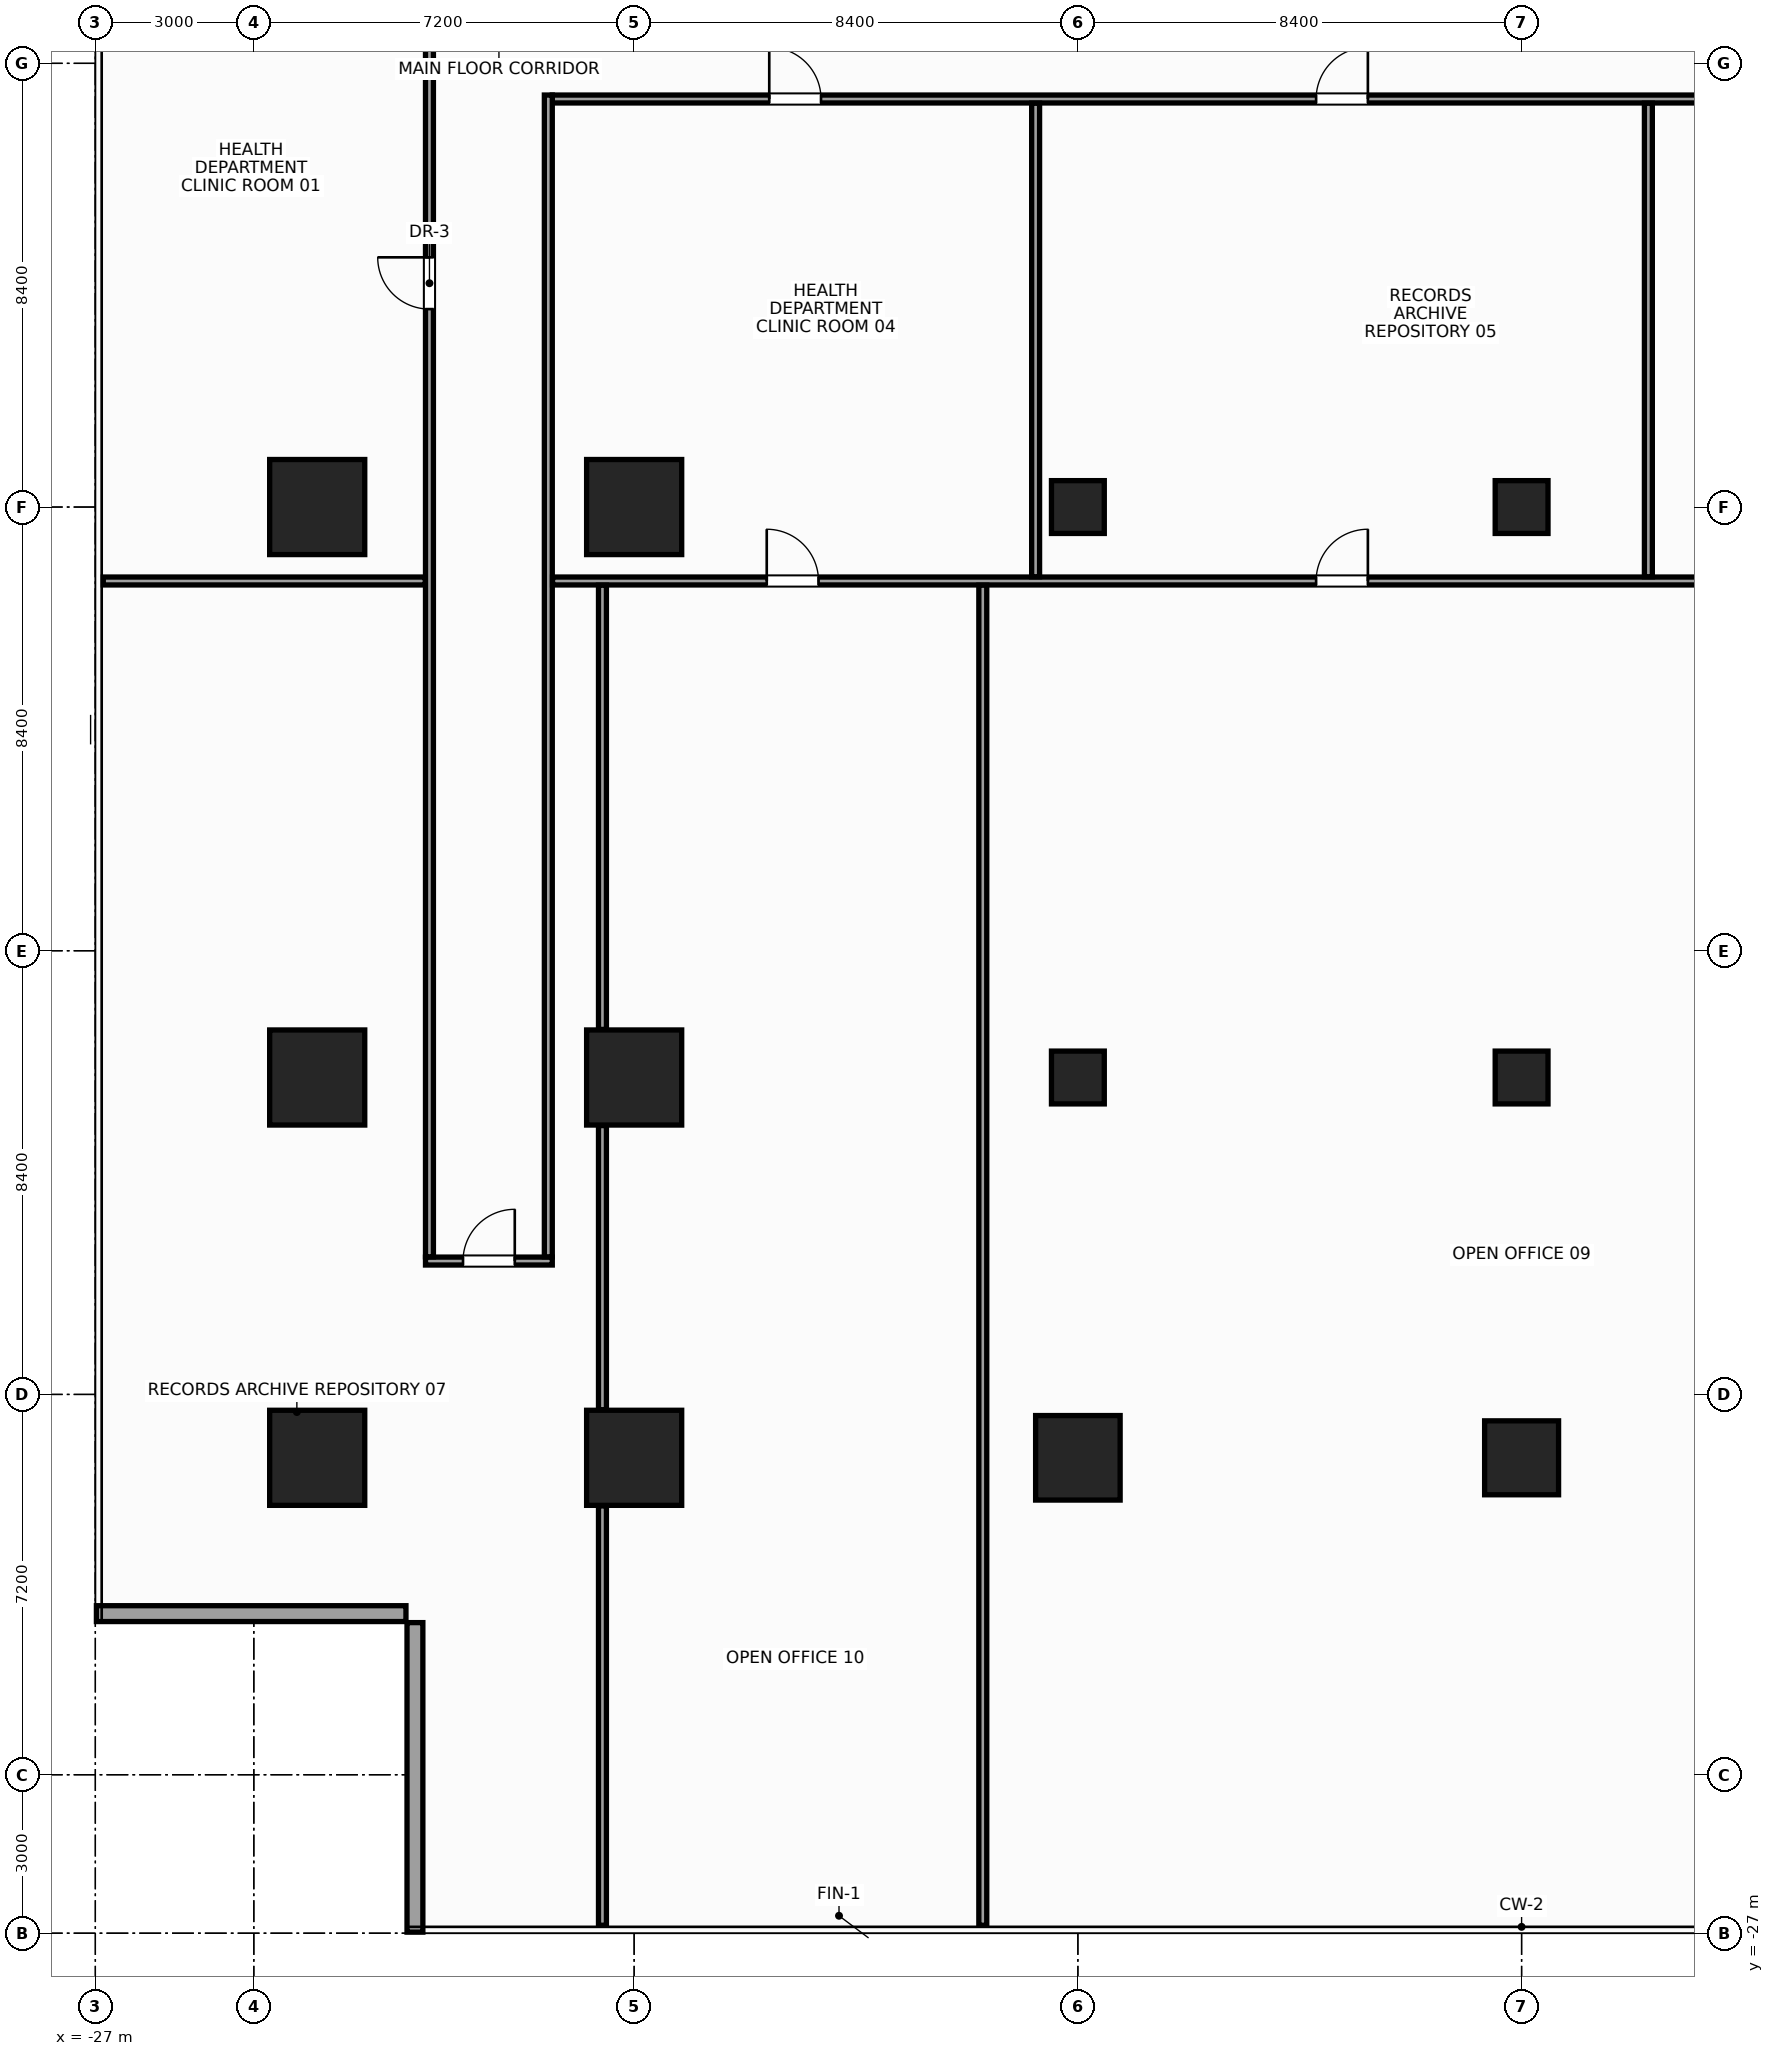
"""IFC4 building model, lengths in metres.
Left out: names, types, materials, properties, quantities, classifications, styles, units other than length and angle.
Written with IfcOpenShell. Run it as: python <this file> out.ifc"""

import sys

from ifc_helpers import new_model, si_unit, direction, frame, frame_2d, origin, origin_2d, place, context, subcontext, project, spatial, rectangle, hollow_rectangle, extrude, source, transform, mapped, element, fill, save


model = new_model("IFC4")
c1 = context("Model", 3, precision=1e-05, world=origin(), true_north=direction((0.0, 1.0)))
c2 = subcontext(c1, "Body", "Model", "MODEL_VIEW")
j1 = project(units=[si_unit("LENGTHUNIT", "METRE"), si_unit("PLANEANGLEUNIT", "RADIAN")], contexts=[c1])
p1 = place(None, origin())
s1 = spatial("IfcSite", under=j1, at=p1, CompositionType="ELEMENT")
p2 = place(p1, origin())
s2 = spatial("IfcBuilding", under=s1, at=p2, CompositionType="ELEMENT")
p3 = place(p2, frame((0.0, 0.0, 45.2)))
s3 = spatial("IfcBuildingStorey", under=s2, at=p3, CompositionType="ELEMENT", Elevation=45.2)
m1 = source(origin(), c2, "Body", "SweptSolid", [
    extrude(rectangle(XDim=1.8, YDim=1.8, at=origin_2d()), origin(), (0.0, 0.0, 1.0), 3.6),
])
for number, where, z_axis, x_axis in (
    (1, (-16.8, -18.0, 0.0), (0.0, 0.0, 1.0), (1.0, 0.0, 0.0)),
    (2, (-16.8, -10.8, 0.0), (0.0, 0.0, 1.0), (1.0, 0.0, 0.0)),
    (3, (-16.8, 0.0, 0.0), (0.0, 0.0, 1.0), (1.0, 0.0, 0.0)),
    (4, (-22.8, -18.0, 0.0), (0.0, 0.0, 1.0), (1.0, 0.0, 0.0)),
    (5, (-22.8, -10.8, 0.0), (0.0, 0.0, 1.0), (1.0, 0.0, 0.0)),
    (6, (-22.8, 0.0, 0.0), (0.0, 0.0, 1.0), (1.0, 0.0, 0.0)),
):
    element("IfcColumn", number, at=place(p3, frame(where, z_axis=z_axis, x_axis=x_axis)), inside=s3, PredefinedType="COLUMN", context=c2, shape_type="MappedRepresentation", body=[
        mapped(m1, transform((0.0, 0.0, 0.0), x_axis=(1.0, 0.0, 0.0), y_axis=(0.0, 1.0, 0.0), z_axis=(0.0, 0.0, 1.0), scale=1.0)),
    ])
m2 = source(origin(), c2, "Body", "SweptSolid", [
    extrude(rectangle(XDim=1.6, YDim=1.6, at=origin_2d()), origin(), (0.0, 0.0, 1.0), 3.6),
])
p4 = place(p3, frame((-8.4, -18.0, 0.0), z_axis=(0.0, 0.0, 1.0), x_axis=(1.0, 0.0, 0.0)))
e7 = element("IfcColumn", 7, at=p4, inside=s3, PredefinedType="COLUMN", context=c2, shape_type="MappedRepresentation", body=[
    mapped(m2, transform((0.0, 0.0, 0.0), x_axis=(1.0, 0.0, 0.0), y_axis=(0.0, 1.0, 0.0), z_axis=(0.0, 0.0, 1.0), scale=1.0)),
])
m3 = source(origin(), c2, "Body", "SweptSolid", [
    extrude(hollow_rectangle(XDim=1.0, YDim=1.0, WallThickness=0.045, at=origin_2d()), origin(), (0.0, 0.0, 1.0), 3.6),
])
for number, where, z_axis, x_axis in (
    (8, (-8.4, 0.0, 0.0), (0.0, 0.0, 1.0), (1.0, 0.0, 0.0)),
    (9, (-8.4, -10.8, 0.0), (0.0, 0.0, 1.0), (1.0, 0.0, 0.0)),
):
    element("IfcColumn", number, at=place(p3, frame(where, z_axis=z_axis, x_axis=x_axis)), inside=s3, PredefinedType="COLUMN", context=c2, shape_type="MappedRepresentation", body=[
        mapped(m3, transform((0.0, 0.0, 0.0), x_axis=(1.0, 0.0, 0.0), y_axis=(0.0, 1.0, 0.0), z_axis=(0.0, 0.0, 1.0), scale=1.0)),
    ])
m4 = source(origin(), c2, "Body", "SweptSolid", [
    extrude(rectangle(XDim=1.4, YDim=1.4, at=origin_2d()), origin(), (0.0, 0.0, 1.0), 3.6),
])
p5 = place(p3, frame((0.0, -18.0, 0.0), z_axis=(0.0, 0.0, 1.0), x_axis=(1.0, 0.0, 0.0)))
e10 = element("IfcColumn", 10, at=p5, inside=s3, PredefinedType="COLUMN", context=c2, shape_type="MappedRepresentation", body=[
    mapped(m4, transform((0.0, 0.0, 0.0), x_axis=(1.0, 0.0, 0.0), y_axis=(0.0, 1.0, 0.0), z_axis=(0.0, 0.0, 1.0), scale=1.0)),
])
m5 = source(origin(), c2, "Body", "SweptSolid", [
    extrude(rectangle(XDim=1.0, YDim=1.0, at=origin_2d()), origin(), (0.0, 0.0, 1.0), 3.6),
])
for number, where, z_axis, x_axis in (
    (11, (0.0, -10.8, 0.0), (0.0, 0.0, 1.0), (1.0, 0.0, 0.0)),
    (12, (0.0, 0.0, 0.0), (0.0, 0.0, 1.0), (1.0, 0.0, 0.0)),
):
    element("IfcColumn", number, at=place(p3, frame(where, z_axis=z_axis, x_axis=x_axis)), inside=s3, PredefinedType="COLUMN", context=c2, shape_type="MappedRepresentation", body=[
        mapped(m5, transform((0.0, 0.0, 0.0), x_axis=(1.0, 0.0, 0.0), y_axis=(0.0, 1.0, 0.0), z_axis=(0.0, 0.0, 1.0), scale=1.0)),
    ])
m6 = source(origin(), c2, "Body", "SweptSolid", [
    extrude(rectangle(XDim=5.86, YDim=0.3, at=frame_2d((2.93, 0.0))), origin(), (0.0, 0.0, 1.0), 2.74),
])
for number, where, z_axis, x_axis in (
    (13, (-26.98, -20.95, 0.0), (0.0, 0.0, 1.0), (1.0, 0.0, 0.0)),
    (14, (-20.95, -21.12, 0.0), (0.0, 0.0, 1.0), (0.0, -1.0, 0.0)),
):
    element("IfcWall", number, at=place(p3, frame(where, z_axis=z_axis, x_axis=x_axis)), inside=s3, PredefinedType="STANDARD", context=c2, shape_type="MappedRepresentation", body=[
        mapped(m6, transform((0.0, 0.0, 0.0), x_axis=(1.0, 0.0, 0.0), y_axis=(0.0, 1.0, 0.0), z_axis=(0.0, 0.0, 1.0), scale=1.0)),
    ])
m7 = source(origin(), c2, "Body", "SweptSolid", [
    extrude(rectangle(XDim=36.7, YDim=0.15, at=frame_2d((18.35, 0.0))), origin(), (0.0, 0.0, 1.0), 2.745),
])
p6 = place(p3, frame((-18.35, 7.725, 0.0), z_axis=(0.0, 0.0, 1.0), x_axis=(1.0, 0.0, 0.0)))
e15 = element("IfcWall", 15, at=p6, inside=s3, PredefinedType="PARTITIONING", context=c2, shape_type="MappedRepresentation", body=[
    mapped(m7, transform((0.0, 0.0, 0.0), x_axis=(1.0, 0.0, 0.0), y_axis=(0.0, 1.0, 0.0), z_axis=(0.0, 0.0, 1.0), scale=1.0)),
])
p7 = place(p6, frame((33.312, 0.0, 0.0)))
e16 = element("IfcOpeningElement", 16, at=p7, cuts=e15, PredefinedType="OPENING", context=c2, shape_type="SweptSolid", body=[
    extrude(rectangle(XDim=0.98, YDim=2.15, at=frame_2d((0.49, 1.075))), frame((0.0, 0.087, 0.0), z_axis=(0.0, -1.0, 0.0), x_axis=(1.0, 0.0, 0.0)), (0.0, 0.0, 1.0), 0.174),
])
p8 = place(p6, frame((4.107, 0.0, 0.0)))
e17 = element("IfcOpeningElement", 17, at=p8, cuts=e15, PredefinedType="OPENING", context=c2, shape_type="SweptSolid", body=[
    extrude(rectangle(XDim=0.98, YDim=2.15, at=frame_2d((0.49, 1.075))), frame((0.0, 0.087, 0.0), z_axis=(0.0, -1.0, 0.0), x_axis=(1.0, 0.0, 0.0)), (0.0, 0.0, 1.0), 0.174),
])
p9 = place(p6, frame((14.46, 0.0, 0.0)))
e18 = element("IfcOpeningElement", 18, at=p9, cuts=e15, PredefinedType="OPENING", context=c2, shape_type="SweptSolid", body=[
    extrude(rectangle(XDim=0.98, YDim=2.15, at=frame_2d((0.49, 1.075))), frame((0.0, 0.087, 0.0), z_axis=(0.0, -1.0, 0.0), x_axis=(1.0, 0.0, 0.0)), (0.0, 0.0, 1.0), 0.174),
])
p10 = place(p6, frame((25.36, 0.0, 0.0)))
e19 = element("IfcOpeningElement", 19, at=p10, cuts=e15, PredefinedType="OPENING", context=c2, shape_type="SweptSolid", body=[
    extrude(rectangle(XDim=0.98, YDim=2.15, at=frame_2d((0.49, 1.075))), frame((0.0, 0.087, 0.0), z_axis=(0.0, -1.0, 0.0), x_axis=(1.0, 0.0, 0.0)), (0.0, 0.0, 1.0), 0.174),
])
m8 = source(origin(), c2, "Body", "SweptSolid", [
    extrude(rectangle(XDim=2.4, YDim=0.15, at=frame_2d((1.2, 0.0))), origin(), (0.0, 0.0, 1.0), 2.895),
])
p11 = place(p3, frame((-20.75, -14.275, 0.0), z_axis=(0.0, 0.0, 1.0), x_axis=(1.0, 0.0, 0.0)))
e20 = element("IfcWall", 20, at=p11, inside=s3, PredefinedType="PARTITIONING", context=c2, shape_type="MappedRepresentation", body=[
    mapped(m8, transform((0.0, 0.0, 0.0), x_axis=(1.0, 0.0, 0.0), y_axis=(0.0, 1.0, 0.0), z_axis=(0.0, 0.0, 1.0), scale=1.0)),
])
p12 = place(p11, frame((0.71, 0.0, 0.0)))
e21 = element("IfcOpeningElement", 21, at=p12, cuts=e20, PredefinedType="OPENING", context=c2, shape_type="SweptSolid", body=[
    extrude(rectangle(XDim=0.98, YDim=2.15, at=frame_2d((0.49, 1.075))), frame((0.0, 0.087, 0.0), z_axis=(0.0, -1.0, 0.0), x_axis=(1.0, 0.0, 0.0)), (0.0, 0.0, 1.0), 0.174),
])
m9 = source(origin(), c2, "Body", "SweptSolid", [
    extrude(rectangle(XDim=24.115, YDim=0.15, at=frame_2d((12.058, 0.0))), origin(), (0.0, 0.0, 1.0), 2.745),
])
p13 = place(p3, frame((-20.675, -14.195, 0.0), z_axis=(0.0, 0.0, 1.0), x_axis=(0.0, 1.0, 0.0)))
e22 = element("IfcWall", 22, at=p13, inside=s3, PredefinedType="PARTITIONING", context=c2, shape_type="MappedRepresentation", body=[
    mapped(m9, transform((0.0, 0.0, 0.0), x_axis=(1.0, 0.0, 0.0), y_axis=(0.0, 1.0, 0.0), z_axis=(0.0, 0.0, 1.0), scale=1.0)),
])
p14 = place(p13, frame((17.942, 0.0, 0.0)))
e23 = element("IfcOpeningElement", 23, at=p14, cuts=e22, PredefinedType="OPENING", context=c2, shape_type="SweptSolid", body=[
    extrude(rectangle(XDim=0.98, YDim=2.15, at=frame_2d((0.49, 1.075))), frame((0.0, 0.087, 0.0), z_axis=(0.0, -1.0, 0.0), x_axis=(1.0, 0.0, 0.0)), (0.0, 0.0, 1.0), 0.174),
])
m10 = source(origin(), c2, "Body", "SweptSolid", [
    extrude(rectangle(XDim=21.995, YDim=0.15, at=frame_2d((10.998, 0.0))), origin(), (0.0, 0.0, 1.0), 2.745),
])
p15 = place(p3, frame((-18.425, -14.195, 0.0), z_axis=(0.0, 0.0, 1.0), x_axis=(0.0, 1.0, 0.0)))
e24 = element("IfcWall", 24, at=p15, inside=s3, PredefinedType="PARTITIONING", context=c2, shape_type="MappedRepresentation", body=[
    mapped(m10, transform((0.0, 0.0, 0.0), x_axis=(1.0, 0.0, 0.0), y_axis=(0.0, 1.0, 0.0), z_axis=(0.0, 0.0, 1.0), scale=1.0)),
])
m11 = source(origin(), c2, "Body", "SweptSolid", [
    extrude(rectangle(XDim=6.095, YDim=0.15, at=frame_2d((3.048, 0.0))), origin(), (0.0, 0.0, 1.0), 2.745),
])
p16 = place(p3, frame((-26.85, -1.4, 0.0), z_axis=(0.0, 0.0, 1.0), x_axis=(1.0, 0.0, 0.0)))
e25 = element("IfcWall", 25, at=p16, inside=s3, PredefinedType="PARTITIONING", context=c2, shape_type="MappedRepresentation", body=[
    mapped(m11, transform((0.0, 0.0, 0.0), x_axis=(1.0, 0.0, 0.0), y_axis=(0.0, 1.0, 0.0), z_axis=(0.0, 0.0, 1.0), scale=1.0)),
])
m12 = source(origin(), c2, "Body", "SweptSolid", [
    extrude(rectangle(XDim=36.69, YDim=0.15, at=frame_2d((18.345, 0.0))), origin(), (0.0, 0.0, 1.0), 2.745),
])
p17 = place(p3, frame((-18.345, -1.4, 0.0), z_axis=(0.0, 0.0, 1.0), x_axis=(1.0, 0.0, 0.0)))
e26 = element("IfcWall", 26, at=p17, inside=s3, PredefinedType="PARTITIONING", context=c2, shape_type="MappedRepresentation", body=[
    mapped(m12, transform((0.0, 0.0, 0.0), x_axis=(1.0, 0.0, 0.0), y_axis=(0.0, 1.0, 0.0), z_axis=(0.0, 0.0, 1.0), scale=1.0)),
])
p18 = place(p17, frame((14.455, 0.0, 0.0)))
e27 = element("IfcOpeningElement", 27, at=p18, cuts=e26, PredefinedType="OPENING", context=c2, shape_type="SweptSolid", body=[
    extrude(rectangle(XDim=0.98, YDim=2.15, at=frame_2d((0.49, 1.075))), frame((0.0, 0.087, 0.0), z_axis=(0.0, -1.0, 0.0), x_axis=(1.0, 0.0, 0.0)), (0.0, 0.0, 1.0), 0.174),
])
p19 = place(p17, frame((4.055, 0.0, 0.0)))
e28 = element("IfcOpeningElement", 28, at=p19, cuts=e26, PredefinedType="OPENING", context=c2, shape_type="SweptSolid", body=[
    extrude(rectangle(XDim=0.98, YDim=2.15, at=frame_2d((0.49, 1.075))), frame((0.0, 0.087, 0.0), z_axis=(0.0, -1.0, 0.0), x_axis=(1.0, 0.0, 0.0)), (0.0, 0.0, 1.0), 0.174),
])
p20 = place(p17, frame((32.415, 0.0, 0.0)))
e29 = element("IfcOpeningElement", 29, at=p20, cuts=e26, PredefinedType="OPENING", context=c2, shape_type="SweptSolid", body=[
    extrude(rectangle(XDim=0.98, YDim=2.15, at=frame_2d((0.49, 1.075))), frame((0.0, 0.087, 0.0), z_axis=(0.0, -1.0, 0.0), x_axis=(1.0, 0.0, 0.0)), (0.0, 0.0, 1.0), 0.174),
])
m13 = source(origin(), c2, "Body", "SweptSolid", [
    extrude(rectangle(XDim=8.965, YDim=0.15, at=frame_2d((4.482, 0.0))), origin(), (0.0, 0.0, 1.0), 2.645),
])
for number, where, z_axis, x_axis in (
    (30, (-9.2, -1.32, 0.0), (0.0, 0.0, 1.0), (0.0, 1.0, 0.0)),
    (31, (2.4, -1.32, 0.0), (0.0, 0.0, 1.0), (0.0, 1.0, 0.0)),
):
    element("IfcWall", number, at=place(p3, frame(where, z_axis=z_axis, x_axis=x_axis)), inside=s3, PredefinedType="PARTITIONING", context=c2, shape_type="MappedRepresentation", body=[
        mapped(m13, transform((0.0, 0.0, 0.0), x_axis=(1.0, 0.0, 0.0), y_axis=(0.0, 1.0, 0.0), z_axis=(0.0, 0.0, 1.0), scale=1.0)),
    ])
m14 = source(origin(), c2, "Body", "SweptSolid", [
    extrude(rectangle(XDim=7.94, YDim=0.15, at=frame_2d((3.97, 0.0))), origin(), (0.0, 0.0, 1.0), 3.36),
])
p21 = place(p3, frame((-17.4, -26.85, 0.0), z_axis=(0.0, 0.0, 1.0), x_axis=(0.0, 1.0, 0.0)))
e32 = element("IfcWall", 32, at=p21, inside=s3, PredefinedType="PARTITIONING", context=c2, shape_type="MappedRepresentation", body=[
    mapped(m14, transform((0.0, 0.0, 0.0), x_axis=(1.0, 0.0, 0.0), y_axis=(0.0, 1.0, 0.0), z_axis=(0.0, 0.0, 1.0), scale=1.0)),
])
m15 = source(origin(), c2, "Body", "SweptSolid", [
    extrude(rectangle(XDim=5.38, YDim=0.15, at=frame_2d((2.69, 0.0))), origin(), (0.0, 0.0, 1.0), 3.36),
])
p22 = place(p3, frame((-17.4, -17.09, 0.0), z_axis=(0.0, 0.0, 1.0), x_axis=(0.0, 1.0, 0.0)))
e33 = element("IfcWall", 33, at=p22, inside=s3, PredefinedType="PARTITIONING", context=c2, shape_type="MappedRepresentation", body=[
    mapped(m15, transform((0.0, 0.0, 0.0), x_axis=(1.0, 0.0, 0.0), y_axis=(0.0, 1.0, 0.0), z_axis=(0.0, 0.0, 1.0), scale=1.0)),
])
m16 = source(origin(), c2, "Body", "SweptSolid", [
    extrude(rectangle(XDim=8.41, YDim=0.15, at=frame_2d((4.205, 0.0))), origin(), (0.0, 0.0, 1.0), 3.36),
])
p23 = place(p3, frame((-17.4, -9.89, 0.0), z_axis=(0.0, 0.0, 1.0), x_axis=(0.0, 1.0, 0.0)))
e34 = element("IfcWall", 34, at=p23, inside=s3, PredefinedType="PARTITIONING", context=c2, shape_type="MappedRepresentation", body=[
    mapped(m16, transform((0.0, 0.0, 0.0), x_axis=(1.0, 0.0, 0.0), y_axis=(0.0, 1.0, 0.0), z_axis=(0.0, 0.0, 1.0), scale=1.0)),
])
m17 = source(origin(), c2, "Body", "SweptSolid", [
    extrude(rectangle(XDim=25.37, YDim=0.15, at=frame_2d((12.685, 0.0))), origin(), (0.0, 0.0, 1.0), 2.745),
])
p24 = place(p3, frame((-10.2, -26.85, 0.0), z_axis=(0.0, 0.0, 1.0), x_axis=(0.0, 1.0, 0.0)))
e35 = element("IfcWall", 35, at=p24, inside=s3, PredefinedType="PARTITIONING", context=c2, shape_type="MappedRepresentation", body=[
    mapped(m17, transform((0.0, 0.0, 0.0), x_axis=(1.0, 0.0, 0.0), y_axis=(0.0, 1.0, 0.0), z_axis=(0.0, 0.0, 1.0), scale=1.0)),
])
m18 = source(origin(), c2, "Body", "SweptSolid", [
    extrude(rectangle(XDim=0.98, YDim=2.15, at=frame_2d((0.49, 1.075))), frame((0.0, 0.025, 0.0), z_axis=(0.0, -1.0, 0.0), x_axis=(1.0, 0.0, 0.0)), (0.0, 0.0, 1.0), 0.05),
])
p25 = place(p14, origin())
e36 = element("IfcDoor", 36, at=p25, inside=s3, OperationType="SINGLE_SWING_RIGHT", PredefinedType="DOOR", context=c2, shape_type="MappedRepresentation", body=[
    mapped(m18, transform((0.0, 0.0, 0.0), x_axis=(1.0, 0.0, 0.0), y_axis=(0.0, 1.0, 0.0), z_axis=(0.0, 0.0, 1.0), scale=1.0)),
])
fill(e23, e36)
p26 = place(p8, origin())
e37 = element("IfcDoor", 37, at=p26, inside=s3, OperationType="SINGLE_SWING_LEFT", PredefinedType="DOOR", context=c2, shape_type="MappedRepresentation", body=[
    mapped(m18, transform((0.0, 0.0, 0.0), x_axis=(1.0, 0.0, 0.0), y_axis=(0.0, 1.0, 0.0), z_axis=(0.0, 0.0, 1.0), scale=1.0)),
])
fill(e17, e37)
p27 = place(p9, origin())
e38 = element("IfcDoor", 38, at=p27, inside=s3, OperationType="SINGLE_SWING_RIGHT", PredefinedType="DOOR", context=c2, shape_type="MappedRepresentation", body=[
    mapped(m18, transform((0.0, 0.0, 0.0), x_axis=(1.0, 0.0, 0.0), y_axis=(0.0, 1.0, 0.0), z_axis=(0.0, 0.0, 1.0), scale=1.0)),
])
fill(e18, e38)
p28 = place(p12, origin())
e39 = element("IfcDoor", 39, at=p28, inside=s3, OperationType="SINGLE_SWING_RIGHT", PredefinedType="DOOR", context=c2, shape_type="MappedRepresentation", body=[
    mapped(m18, transform((0.0, 0.0, 0.0), x_axis=(1.0, 0.0, 0.0), y_axis=(0.0, 1.0, 0.0), z_axis=(0.0, 0.0, 1.0), scale=1.0)),
])
fill(e21, e39)
p29 = place(p18, origin())
e40 = element("IfcDoor", 40, at=p29, inside=s3, OperationType="SINGLE_SWING_RIGHT", PredefinedType="DOOR", context=c2, shape_type="MappedRepresentation", body=[
    mapped(m18, transform((0.0, 0.0, 0.0), x_axis=(1.0, 0.0, 0.0), y_axis=(0.0, 1.0, 0.0), z_axis=(0.0, 0.0, 1.0), scale=1.0)),
])
fill(e27, e40)
p30 = place(p19, origin())
e41 = element("IfcDoor", 41, at=p30, inside=s3, OperationType="SINGLE_SWING_LEFT", PredefinedType="DOOR", context=c2, shape_type="MappedRepresentation", body=[
    mapped(m18, transform((0.0, 0.0, 0.0), x_axis=(1.0, 0.0, 0.0), y_axis=(0.0, 1.0, 0.0), z_axis=(0.0, 0.0, 1.0), scale=1.0)),
])
fill(e28, e41)
save(model, sys.argv[1])
